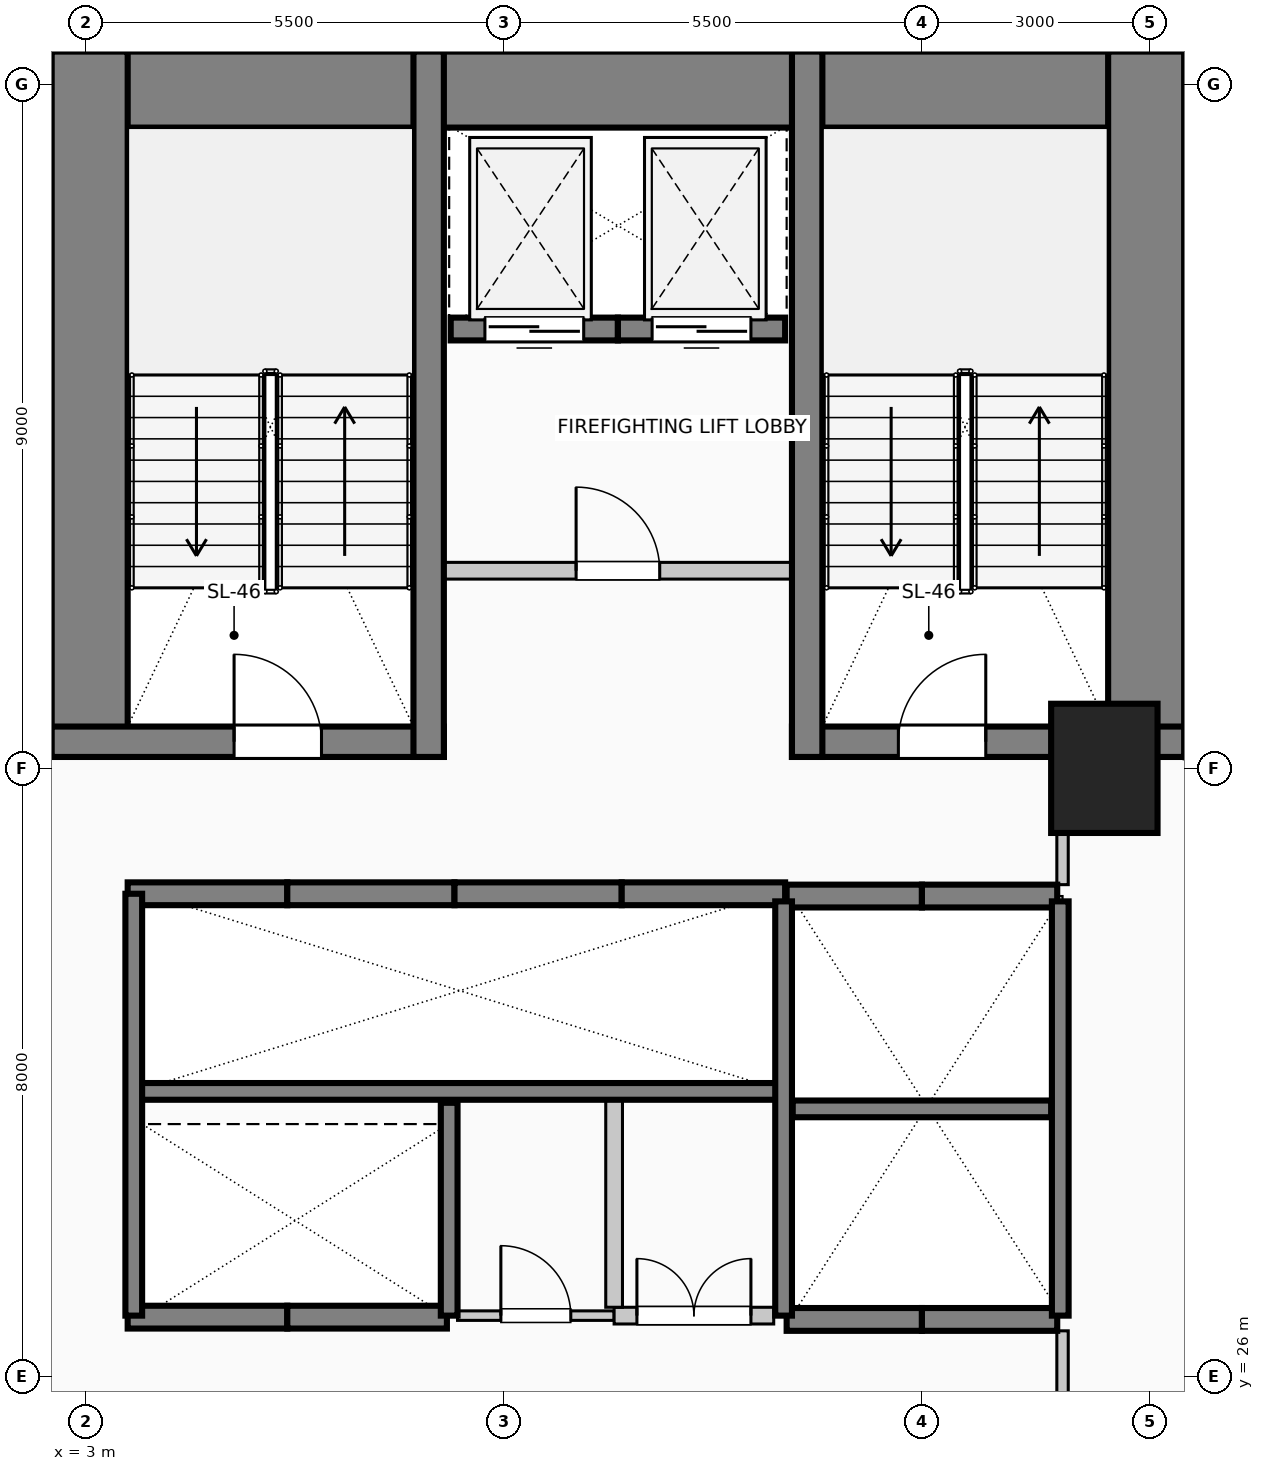
"""IFC4 building model, lengths in metres.
Left out: names, types, materials, properties, quantities, classifications, styles, units other than length and angle.
Written with IfcOpenShell. Run it as: python <this file> out.ifc"""

import sys

from ifc_helpers import new_model, si_unit, direction, frame, frame_2d, origin, origin_2d, place, context, subcontext, project, spatial, rectangle, extrude, element, fill, save


model = new_model("IFC4")
c1 = context("Model", 3, precision=1e-05, world=origin(), true_north=direction((0.0, 1.0)))
c2 = subcontext(c1, "Body", "Model", "MODEL_VIEW")
j1 = project(units=[si_unit("LENGTHUNIT", "METRE"), si_unit("PLANEANGLEUNIT", "RADIAN")], contexts=[c1])
p1 = place(None, origin())
s1 = spatial("IfcSite", under=j1, at=p1, CompositionType="ELEMENT")
p2 = place(p1, origin())
s2 = spatial("IfcBuilding", under=s1, at=p2, CompositionType="ELEMENT")
p3 = place(p2, frame((0.0, 0.0, 9.45)))
s3 = spatial("IfcBuildingStorey", under=s2, at=p3, CompositionType="ELEMENT", Elevation=9.45)
p4 = place(p3, frame((2.55, 42.93, 0.0), z_axis=(0.0, 0.0, 1.0), x_axis=(1.0, 0.0, 0.0)))
e1 = element("IfcWall", 1, at=p4, inside=s3, PredefinedType="SHEAR", context=c2, shape_type="SweptSolid", body=[
    extrude(rectangle(XDim=14.9, YDim=1.0, at=frame_2d((7.45, 0.0))), origin(), (0.0, 0.0, 1.0), 4.05),
])
for number, where, z_axis, x_axis in (
    (2, (3.05, 34.15, 0.0), (0.0, 0.0, 1.0), (0.0, 1.0, 0.0)),
    (3, (16.95, 34.15, 0.0), (0.0, 0.0, 1.0), (0.0, 1.0, 0.0)),
):
    element("IfcWall", number, at=place(p3, frame(where, z_axis=z_axis, x_axis=x_axis)), inside=s3, PredefinedType="SHEAR", context=c2, shape_type="SweptSolid", body=[
        extrude(rectangle(XDim=9.28, YDim=1.0, at=frame_2d((4.64, 0.0))), origin(), (0.0, 0.0, 1.0), 4.05),
    ])
p5 = place(p3, frame((2.55, 34.35, 0.0), z_axis=(0.0, 0.0, 1.0), x_axis=(1.0, 0.0, 0.0)))
e4 = element("IfcWall", 4, at=p5, inside=s3, PredefinedType="SHEAR", context=c2, shape_type="SweptSolid", body=[
    extrude(rectangle(XDim=5.16, YDim=0.4, at=frame_2d((2.58, 0.0))), origin(), (0.0, 0.0, 1.0), 4.05),
])
p6 = place(p5, frame((2.4, 0.0, 0.0)))
e5 = element("IfcOpeningElement", 5, at=p6, cuts=e4, PredefinedType="OPENING", context=c2, shape_type="SweptSolid", body=[
    extrude(rectangle(XDim=1.15, YDim=2.2, at=frame_2d((0.575, 1.1))), frame((0.0, 0.21, 0.0), z_axis=(0.0, -1.0, 0.0), x_axis=(1.0, 0.0, 0.0)), (0.0, 0.0, 1.0), 0.42),
])
p7 = place(p3, frame((12.29, 34.35, 0.0), z_axis=(0.0, 0.0, 1.0), x_axis=(1.0, 0.0, 0.0)))
e6 = element("IfcWall", 6, at=p7, inside=s3, PredefinedType="SHEAR", context=c2, shape_type="SweptSolid", body=[
    extrude(rectangle(XDim=5.16, YDim=0.4, at=frame_2d((2.58, 0.0))), origin(), (0.0, 0.0, 1.0), 4.05),
])
p8 = place(p7, frame((1.4, 0.0, 0.0)))
e7 = element("IfcOpeningElement", 7, at=p8, cuts=e6, PredefinedType="OPENING", context=c2, shape_type="SweptSolid", body=[
    extrude(rectangle(XDim=1.15, YDim=2.2, at=frame_2d((0.575, 1.1))), frame((0.0, 0.21, 0.0), z_axis=(0.0, -1.0, 0.0), x_axis=(1.0, 0.0, 0.0)), (0.0, 0.0, 1.0), 0.42),
])
for number, where, z_axis, x_axis in (
    (8, (7.51, 34.15, 0.0), (0.0, 0.0, 1.0), (0.0, 1.0, 0.0)),
    (9, (12.49, 34.15, 0.0), (0.0, 0.0, 1.0), (0.0, 1.0, 0.0)),
):
    element("IfcWall", number, at=place(p3, frame(where, z_axis=z_axis, x_axis=x_axis)), inside=s3, PredefinedType="SHEAR", context=c2, shape_type="SweptSolid", body=[
        extrude(rectangle(XDim=9.28, YDim=0.4, at=frame_2d((4.64, 0.0))), origin(), (0.0, 0.0, 1.0), 4.05),
    ])
p9 = place(p3, frame((16.4, 34.0, 0.0), z_axis=(0.0, 0.0, 1.0), x_axis=(1.0, 0.0, 0.0)))
e10 = element("IfcColumn", 10, at=p9, inside=s3, PredefinedType="COLUMN", context=c2, shape_type="SweptSolid", body=[
    extrude(rectangle(XDim=1.4, YDim=1.7, at=origin_2d()), origin(), (0.0, 0.0, 1.0), 4.05),
])
for number, where, z_axis, x_axis in (
    (11, (14.0, 26.75, 0.0), (0.0, 0.0, 1.0), (-1.0, 0.0, 0.0)),
    (12, (15.78, 26.75, 0.0), (0.0, 0.0, 1.0), (-1.0, 0.0, 0.0)),
    (13, (12.22, 32.32, 0.0), (0.0, 0.0, 1.0), (1.0, 0.0, 0.0)),
    (14, (14.0, 32.32, 0.0), (0.0, 0.0, 1.0), (1.0, 0.0, 0.0)),
):
    element("IfcWall", number, at=place(p3, frame(where, z_axis=z_axis, x_axis=x_axis)), inside=s3, PredefinedType="SOLIDWALL", context=c2, shape_type="SweptSolid", body=[
        extrude(rectangle(XDim=1.78, YDim=0.3, at=frame_2d((0.89, 0.0))), origin(), (0.0, 0.0, 1.0), 4.05),
    ])
p10 = place(p3, frame((3.55, 32.35, 0.0), z_axis=(0.0, 0.0, 1.0), x_axis=(1.0, 0.0, 0.0)))
e15 = element("IfcWall", 15, at=p10, inside=s3, PredefinedType="SOLIDWALL", context=c2, shape_type="SweptSolid", body=[
    extrude(rectangle(XDim=2.1, YDim=0.3, at=frame_2d((1.05, 0.0))), origin(), (0.0, 0.0, 1.0), 4.05),
])
p11 = place(p3, frame((5.65, 32.35, 0.0), z_axis=(0.0, 0.0, 1.0), x_axis=(1.0, 0.0, 0.0)))
e16 = element("IfcWall", 16, at=p11, inside=s3, PredefinedType="SOLIDWALL", context=c2, shape_type="SweptSolid", body=[
    extrude(rectangle(XDim=2.2, YDim=0.3, at=frame_2d((1.1, 0.0))), origin(), (0.0, 0.0, 1.0), 4.05),
])
p12 = place(p3, frame((7.85, 32.35, 0.0), z_axis=(0.0, 0.0, 1.0), x_axis=(1.0, 0.0, 0.0)))
e17 = element("IfcWall", 17, at=p12, inside=s3, PredefinedType="SOLIDWALL", context=c2, shape_type="SweptSolid", body=[
    extrude(rectangle(XDim=2.2, YDim=0.3, at=frame_2d((1.1, 0.0))), origin(), (0.0, 0.0, 1.0), 4.05),
])
p13 = place(p3, frame((10.05, 32.35, 0.0), z_axis=(0.0, 0.0, 1.0), x_axis=(1.0, 0.0, 0.0)))
e18 = element("IfcWall", 18, at=p13, inside=s3, PredefinedType="SOLIDWALL", context=c2, shape_type="SweptSolid", body=[
    extrude(rectangle(XDim=2.15, YDim=0.3, at=frame_2d((1.075, 0.0))), origin(), (0.0, 0.0, 1.0), 4.05),
])
p14 = place(p3, frame((5.65, 26.78, 0.0), z_axis=(0.0, 0.0, 1.0), x_axis=(-1.0, 0.0, 0.0)))
e19 = element("IfcWall", 19, at=p14, inside=s3, PredefinedType="SOLIDWALL", context=c2, shape_type="SweptSolid", body=[
    extrude(rectangle(XDim=2.1, YDim=0.3, at=frame_2d((1.05, 0.0))), origin(), (0.0, 0.0, 1.0), 4.05),
])
p15 = place(p3, frame((7.75, 26.78, 0.0), z_axis=(0.0, 0.0, 1.0), x_axis=(-1.0, 0.0, 0.0)))
e20 = element("IfcWall", 20, at=p15, inside=s3, PredefinedType="SOLIDWALL", context=c2, shape_type="SweptSolid", body=[
    extrude(rectangle(XDim=2.1, YDim=0.3, at=frame_2d((1.05, 0.0))), origin(), (0.0, 0.0, 1.0), 4.05),
])
p16 = place(p3, frame((10.0, 39.78, 0.0), z_axis=(0.0, 0.0, 1.0), x_axis=(-1.0, 0.0, 0.0)))
e21 = element("IfcWall", 21, at=p16, inside=s3, PredefinedType="SOLIDWALL", context=c2, shape_type="SweptSolid", body=[
    extrude(rectangle(XDim=2.2, YDim=0.3, at=frame_2d((1.1, 0.0))), origin(), (0.0, 0.0, 1.0), 4.05),
])
p17 = place(p16, frame((0.45, 0.0, 0.0)))
e22 = element("IfcOpeningElement", 22, at=p17, cuts=e21, PredefinedType="OPENING", context=c2, shape_type="SweptSolid", body=[
    extrude(rectangle(XDim=1.3, YDim=2.25, at=frame_2d((0.65, 1.125))), frame((0.0, 0.16, 0.0), z_axis=(0.0, -1.0, 0.0), x_axis=(1.0, 0.0, 0.0)), (0.0, 0.0, 1.0), 0.32),
])
p18 = place(p3, frame((12.2, 39.78, 0.0), z_axis=(0.0, 0.0, 1.0), x_axis=(-1.0, 0.0, 0.0)))
e23 = element("IfcWall", 23, at=p18, inside=s3, PredefinedType="SOLIDWALL", context=c2, shape_type="SweptSolid", body=[
    extrude(rectangle(XDim=2.2, YDim=0.3, at=frame_2d((1.1, 0.0))), origin(), (0.0, 0.0, 1.0), 4.05),
])
p19 = place(p18, frame((0.45, 0.0, 0.0)))
e24 = element("IfcOpeningElement", 24, at=p19, cuts=e23, PredefinedType="OPENING", context=c2, shape_type="SweptSolid", body=[
    extrude(rectangle(XDim=1.3, YDim=2.25, at=frame_2d((0.65, 1.125))), frame((0.0, 0.16, 0.0), z_axis=(0.0, -1.0, 0.0), x_axis=(1.0, 0.0, 0.0)), (0.0, 0.0, 1.0), 0.32),
])
p20 = place(p3, frame((3.55, 29.75, 0.0), z_axis=(0.0, 0.0, 1.0), x_axis=(1.0, 0.0, 0.0)))
e25 = element("IfcWall", 25, at=p20, inside=s3, PredefinedType="SOLIDWALL", context=c2, shape_type="SweptSolid", body=[
    extrude(rectangle(XDim=8.65, YDim=0.22, at=frame_2d((4.325, 0.0))), origin(), (0.0, 0.0, 1.0), 4.05),
])
p21 = place(p3, frame((3.63, 26.8, 0.0), z_axis=(0.0, 0.0, 1.0), x_axis=(0.0, 1.0, 0.0)))
e26 = element("IfcWall", 26, at=p21, inside=s3, PredefinedType="SOLIDWALL", context=c2, shape_type="SweptSolid", body=[
    extrude(rectangle(XDim=5.55, YDim=0.22, at=frame_2d((2.775, 0.0))), origin(), (0.0, 0.0, 1.0), 4.05),
])
p22 = place(p3, frame((7.78, 26.8, 0.0), z_axis=(0.0, 0.0, 1.0), x_axis=(0.0, 1.0, 0.0)))
e27 = element("IfcWall", 27, at=p22, inside=s3, PredefinedType="SOLIDWALL", context=c2, shape_type="SweptSolid", body=[
    extrude(rectangle(XDim=2.8, YDim=0.22, at=frame_2d((1.4, 0.0))), origin(), (0.0, 0.0, 1.0), 4.05),
])
for number, where, z_axis, x_axis in (
    (28, (12.18, 26.8, 0.0), (0.0, 0.0, 1.0), (0.0, 1.0, 0.0)),
    (29, (15.82, 26.8, 0.0), (0.0, 0.0, 1.0), (0.0, 1.0, 0.0)),
):
    element("IfcWall", number, at=place(p3, frame(where, z_axis=z_axis, x_axis=x_axis)), inside=s3, PredefinedType="SOLIDWALL", context=c2, shape_type="SweptSolid", body=[
        extrude(rectangle(XDim=5.45, YDim=0.22, at=frame_2d((2.725, 0.0))), origin(), (0.0, 0.0, 1.0), 4.05),
    ])
p23 = place(p3, frame((12.3, 29.52, 0.0), z_axis=(0.0, 0.0, 1.0), x_axis=(1.0, 0.0, 0.0)))
e30 = element("IfcWall", 30, at=p23, inside=s3, PredefinedType="SOLIDWALL", context=c2, shape_type="SweptSolid", body=[
    extrude(rectangle(XDim=3.4, YDim=0.22, at=frame_2d((1.7, 0.0))), origin(), (0.0, 0.0, 1.0), 4.05),
])
p24 = place(p3, frame((7.51, 36.6, 0.0), z_axis=(0.0, 0.0, 1.0), x_axis=(1.0, 0.0, 0.0)))
e31 = element("IfcWall", 31, at=p24, inside=s3, PredefinedType="PARTITIONING", context=c2, shape_type="SweptSolid", body=[
    extrude(rectangle(XDim=4.98, YDim=0.22, at=frame_2d((2.49, 0.0))), origin(), (0.0, 0.0, 1.0), 3.65),
])
p25 = place(p24, frame((1.94, 0.0, 0.0)))
e32 = element("IfcOpeningElement", 32, at=p25, cuts=e31, PredefinedType="OPENING", context=c2, shape_type="SweptSolid", body=[
    extrude(rectangle(XDim=1.1, YDim=2.2, at=frame_2d((0.55, 1.1))), frame((0.0, 0.12, 0.0), z_axis=(0.0, -1.0, 0.0), x_axis=(1.0, 0.0, 0.0)), (0.0, 0.0, 1.0), 0.24),
])
p26 = place(p3, frame((7.89, 26.8, 0.0), z_axis=(0.0, 0.0, 1.0), x_axis=(1.0, 0.0, 0.0)))
e33 = element("IfcWall", 33, at=p26, inside=s3, PredefinedType="PARTITIONING", context=c2, shape_type="SweptSolid", body=[
    extrude(rectangle(XDim=2.06, YDim=0.125, at=frame_2d((1.03, 0.0))), origin(), (0.0, 0.0, 1.0), 3.65),
])
p27 = place(p26, frame((0.57, 0.0, 0.0)))
e34 = element("IfcOpeningElement", 34, at=p27, cuts=e33, PredefinedType="OPENING", context=c2, shape_type="SweptSolid", body=[
    extrude(rectangle(XDim=0.92, YDim=2.1, at=frame_2d((0.46, 1.05))), frame((0.0, 0.073, 0.0), z_axis=(0.0, -1.0, 0.0), x_axis=(1.0, 0.0, 0.0)), (0.0, 0.0, 1.0), 0.145),
])
p28 = place(p3, frame((9.95, 26.8, 0.0), z_axis=(0.0, 0.0, 1.0), x_axis=(1.0, 0.0, 0.0)))
e35 = element("IfcWall", 35, at=p28, inside=s3, PredefinedType="PARTITIONING", context=c2, shape_type="SweptSolid", body=[
    extrude(rectangle(XDim=2.1, YDim=0.22, at=frame_2d((1.05, 0.0))), origin(), (0.0, 0.0, 1.0), 3.65),
])
p29 = place(p28, frame((0.3, 0.0, 0.0)))
e36 = element("IfcOpeningElement", 36, at=p29, cuts=e35, PredefinedType="OPENING", context=c2, shape_type="SweptSolid", body=[
    extrude(rectangle(XDim=1.5, YDim=2.25, at=frame_2d((0.75, 1.125))), frame((0.0, 0.12, 0.0), z_axis=(0.0, -1.0, 0.0), x_axis=(1.0, 0.0, 0.0)), (0.0, 0.0, 1.0), 0.24),
])
p30 = place(p3, frame((9.95, 26.91, 0.0), z_axis=(0.0, 0.0, 1.0), x_axis=(0.0, 1.0, 0.0)))
e37 = element("IfcWall", 37, at=p30, inside=s3, PredefinedType="PARTITIONING", context=c2, shape_type="SweptSolid", body=[
    extrude(rectangle(XDim=2.73, YDim=0.22, at=frame_2d((1.365, 0.0))), origin(), (0.0, 0.0, 1.0), 3.65),
])
p31 = place(p3, frame((15.85, 24.8, 0.0), z_axis=(0.0, 0.0, 1.0), x_axis=(0.0, 1.0, 0.0)))
e38 = element("IfcWall", 38, at=p31, inside=s3, PredefinedType="PARTITIONING", context=c2, shape_type="SweptSolid", body=[
    extrude(rectangle(XDim=1.8, YDim=0.15, at=frame_2d((0.9, 0.0))), origin(), (0.0, 0.0, 1.0), 3.65),
])
p32 = place(p3, frame((15.85, 32.47, 0.0), z_axis=(0.0, 0.0, 1.0), x_axis=(0.0, 1.0, 0.0)))
e39 = element("IfcWall", 39, at=p32, inside=s3, PredefinedType="PARTITIONING", context=c2, shape_type="SweptSolid", body=[
    extrude(rectangle(XDim=0.68, YDim=0.15, at=frame_2d((0.34, 0.0))), origin(), (0.0, 0.0, 1.0), 3.65),
])
p33 = place(p17, origin())
e40 = element("IfcDoor", 40, at=p33, inside=s3, OperationType="SLIDING_TO_LEFT", PredefinedType="DOOR", context=c2, shape_type="SweptSolid", body=[
    extrude(rectangle(XDim=1.3, YDim=2.25, at=frame_2d((0.65, 1.125))), frame((0.0, 0.025, 0.0), z_axis=(0.0, -1.0, 0.0), x_axis=(1.0, 0.0, 0.0)), (0.0, 0.0, 1.0), 0.05),
])
fill(e22, e40)
p34 = place(p19, origin())
e41 = element("IfcDoor", 41, at=p34, inside=s3, OperationType="SLIDING_TO_RIGHT", PredefinedType="DOOR", context=c2, shape_type="SweptSolid", body=[
    extrude(rectangle(XDim=1.3, YDim=2.25, at=frame_2d((0.65, 1.125))), frame((0.0, 0.025, 0.0), z_axis=(0.0, -1.0, 0.0), x_axis=(1.0, 0.0, 0.0)), (0.0, 0.0, 1.0), 0.05),
])
fill(e24, e41)
p35 = place(p6, origin())
e42 = element("IfcDoor", 42, at=p35, inside=s3, OperationType="SINGLE_SWING_LEFT", PredefinedType="DOOR", context=c2, shape_type="SweptSolid", body=[
    extrude(rectangle(XDim=1.15, YDim=2.2, at=frame_2d((0.575, 1.1))), frame((0.0, 0.025, 0.0), z_axis=(0.0, -1.0, 0.0), x_axis=(1.0, 0.0, 0.0)), (0.0, 0.0, 1.0), 0.05),
])
fill(e5, e42)
p36 = place(p8, origin())
e43 = element("IfcDoor", 43, at=p36, inside=s3, OperationType="SINGLE_SWING_RIGHT", PredefinedType="DOOR", context=c2, shape_type="SweptSolid", body=[
    extrude(rectangle(XDim=1.15, YDim=2.2, at=frame_2d((0.575, 1.1))), frame((0.0, 0.025, 0.0), z_axis=(0.0, -1.0, 0.0), x_axis=(1.0, 0.0, 0.0)), (0.0, 0.0, 1.0), 0.05),
])
fill(e7, e43)
p37 = place(p25, origin())
e44 = element("IfcDoor", 44, at=p37, inside=s3, OperationType="SINGLE_SWING_LEFT", PredefinedType="DOOR", context=c2, shape_type="SweptSolid", body=[
    extrude(rectangle(XDim=1.1, YDim=2.2, at=frame_2d((0.55, 1.1))), frame((0.0, 0.025, 0.0), z_axis=(0.0, -1.0, 0.0), x_axis=(1.0, 0.0, 0.0)), (0.0, 0.0, 1.0), 0.05),
])
fill(e32, e44)
p38 = place(p27, origin())
e45 = element("IfcDoor", 45, at=p38, inside=s3, OperationType="SINGLE_SWING_LEFT", PredefinedType="DOOR", context=c2, shape_type="SweptSolid", body=[
    extrude(rectangle(XDim=0.92, YDim=2.1, at=frame_2d((0.46, 1.05))), frame((0.0, 0.025, 0.0), z_axis=(0.0, -1.0, 0.0), x_axis=(1.0, 0.0, 0.0)), (0.0, 0.0, 1.0), 0.05),
])
fill(e34, e45)
p39 = place(p29, origin())
e46 = element("IfcDoor", 46, at=p39, inside=s3, OperationType="DOUBLE_DOOR_SINGLE_SWING", PredefinedType="DOOR", context=c2, shape_type="SweptSolid", body=[
    extrude(rectangle(XDim=1.5, YDim=2.25, at=frame_2d((0.75, 1.125))), frame((0.0, 0.025, 0.0), z_axis=(0.0, -1.0, 0.0), x_axis=(1.0, 0.0, 0.0)), (0.0, 0.0, 1.0), 0.05),
])
fill(e36, e46)
save(model, sys.argv[1])
